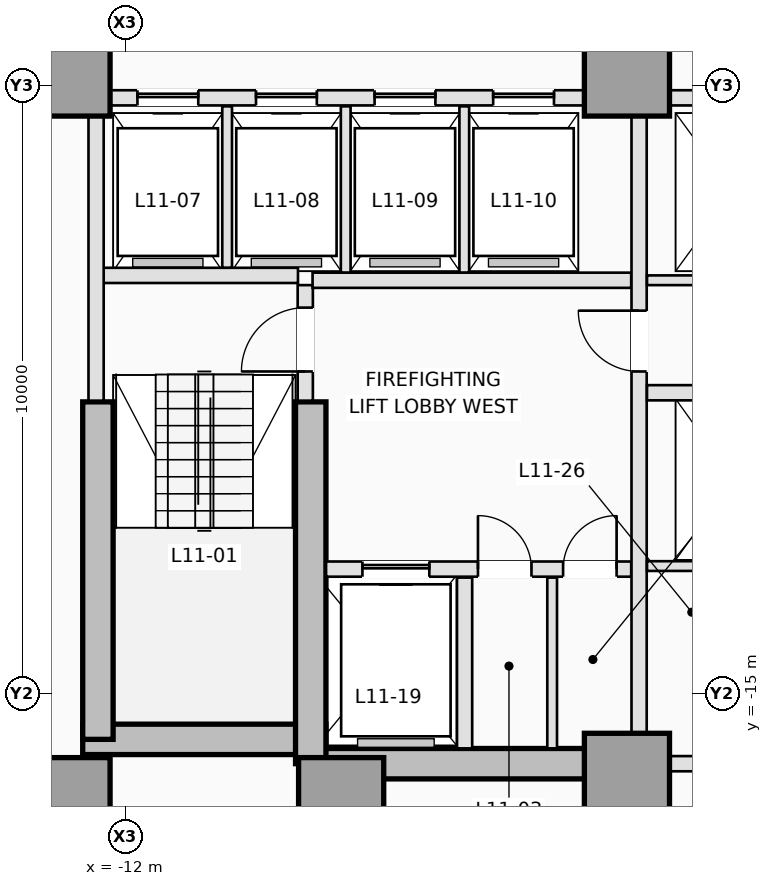
"""IFC4 building model, lengths in metres.
Left out: names, types, materials, properties, quantities, classifications, styles, units other than length and angle.
Written with IfcOpenShell. Run it as: python <this file> out.ifc"""

import sys

from ifc_helpers import new_model, si_unit, direction, frame, frame_2d, origin, origin_2d, place, context, subcontext, project, spatial, rectangle, extrude, element, fill, save


model = new_model("IFC4")
c1 = context("Model", 3, precision=1e-05, world=origin(), true_north=direction((0.0, 1.0)))
c2 = subcontext(c1, "Body", "Model", "MODEL_VIEW")
j1 = project(units=[si_unit("LENGTHUNIT", "METRE"), si_unit("PLANEANGLEUNIT", "RADIAN")], contexts=[c1])
p1 = place(None, origin())
s1 = spatial("IfcSite", under=j1, at=p1, CompositionType="ELEMENT")
p2 = place(p1, origin())
s2 = spatial("IfcBuilding", under=s1, at=p2, CompositionType="ELEMENT")
p3 = place(p2, frame((0.0, 0.0, 45.1)))
s3 = spatial("IfcBuildingStorey", under=s2, at=p3, CompositionType="ELEMENT", Elevation=45.1)
p4 = place(p3, frame((-12.7, -15.75, 0.0), z_axis=(0.0, 0.0, 1.0), x_axis=(1.0, 0.0, 0.0)))
e1 = element("IfcWall", 1, at=p4, inside=s3, PredefinedType="SHEAR", context=c2, shape_type="SweptSolid", body=[
    extrude(rectangle(XDim=4.0, YDim=0.5, at=frame_2d((2.0, 0.0))), origin(), (0.0, 0.0, 1.0), 3.5),
])
p5 = place(p3, frame((-8.95, -16.15, 0.0), z_axis=(0.0, 0.0, 1.0), x_axis=(1.0, 0.0, 0.0)))
e2 = element("IfcWall", 2, at=p5, inside=s3, PredefinedType="SHEAR", context=c2, shape_type="SweptSolid", body=[
    extrude(rectangle(XDim=5.2, YDim=0.5, at=frame_2d((2.6, 0.0))), origin(), (0.0, 0.0, 1.0), 3.5),
])
p6 = place(p3, frame((-12.45, -15.75, 0.0), z_axis=(0.0, 0.0, 1.0), x_axis=(0.0, 1.0, 0.0)))
e3 = element("IfcWall", 3, at=p6, inside=s3, PredefinedType="SHEAR", context=c2, shape_type="SweptSolid", body=[
    extrude(rectangle(XDim=5.55, YDim=0.5, at=frame_2d((2.775, 0.0))), origin(), (0.0, 0.0, 1.0), 3.5),
])
p7 = place(p3, frame((-8.95, -16.15, 0.0), z_axis=(0.0, 0.0, 1.0), x_axis=(0.0, 1.0, 0.0)))
e4 = element("IfcWall", 4, at=p7, inside=s3, PredefinedType="SHEAR", context=c2, shape_type="SweptSolid", body=[
    extrude(rectangle(XDim=5.95, YDim=0.5, at=frame_2d((2.975, 0.0))), origin(), (0.0, 0.0, 1.0), 3.5),
])
for number, where, z_axis, x_axis in (
    (5, (-12.95, -16.75, 0.0), (0.0, 0.0, 1.0), (1.0, 0.0, 0.0)),
    (6, (-8.45, -16.75, 0.0), (0.0, 0.0, 1.0), (1.0, 0.0, 0.0)),
    (7, (-3.75, -16.35, 0.0), (0.0, 0.0, 1.0), (1.0, 0.0, 0.0)),
    (8, (-12.95, -4.8, 0.0), (0.0, 0.0, 1.0), (1.0, 0.0, 0.0)),
    (9, (-3.75, -4.8, 0.0), (0.0, 0.0, 1.0), (1.0, 0.0, 0.0)),
):
    element("IfcColumn", number, at=place(p3, frame(where, z_axis=z_axis, x_axis=x_axis)), inside=s3, PredefinedType="COLUMN", context=c2, shape_type="SweptSolid", body=[
        extrude(rectangle(XDim=1.4, YDim=1.4, at=origin_2d()), origin(), (0.0, 0.0, 1.0), 3.5),
    ])
p8 = place(p3, frame((-9.04, -10.18, 0.0), z_axis=(0.0, 0.0, 1.0), x_axis=(0.0, 1.0, 0.0)))
e10 = element("IfcWall", 10, at=p8, inside=s3, PredefinedType="PARTITIONING", context=c2, shape_type="SweptSolid", body=[
    extrude(rectangle(XDim=1.9, YDim=0.25, at=frame_2d((0.95, 0.0))), origin(), (0.0, 0.0, 1.0), 3.25),
])
p9 = place(p8, frame((0.48, 0.0, 0.0)))
e11 = element("IfcOpeningElement", 11, at=p9, cuts=e10, PredefinedType="OPENING", context=c2, shape_type="SweptSolid", body=[
    extrude(rectangle(XDim=1.05, YDim=2.15, at=frame_2d((0.525, 1.075))), frame((0.0, 0.135, 0.0), z_axis=(0.0, -1.0, 0.0), x_axis=(1.0, 0.0, 0.0)), (0.0, 0.0, 1.0), 0.27),
])
p10 = place(p3, frame((-12.38, -8.12, 0.0), z_axis=(0.0, 0.0, 1.0), x_axis=(1.0, 0.0, 0.0)))
e12 = element("IfcWall", 12, at=p10, inside=s3, PredefinedType="PARTITIONING", context=c2, shape_type="SweptSolid", body=[
    extrude(rectangle(XDim=3.22, YDim=0.25, at=frame_2d((1.61, 0.0))), origin(), (0.0, 0.0, 1.0), 3.25),
])
p11 = place(p3, frame((-12.48, -10.18, 0.0), z_axis=(0.0, 0.0, 1.0), x_axis=(0.0, 1.0, 0.0)))
e13 = element("IfcWall", 13, at=p11, inside=s3, PredefinedType="PARTITIONING", context=c2, shape_type="SweptSolid", body=[
    extrude(rectangle(XDim=4.678, YDim=0.25, at=frame_2d((2.339, 0.0))), origin(), (0.0, 0.0, 1.0), 3.25),
])
p12 = place(p3, frame((-8.698, -12.95, 0.0), z_axis=(0.0, 0.0, 1.0), x_axis=(1.0, 0.0, 0.0)))
e14 = element("IfcWall", 14, at=p12, inside=s3, PredefinedType="PARTITIONING", context=c2, shape_type="SweptSolid", body=[
    extrude(rectangle(XDim=5.018, YDim=0.25, at=frame_2d((2.509, 0.0))), origin(), (0.0, 0.0, 1.0), 3.25),
])
p13 = place(p12, frame((0.598, 0.0, 0.0)))
e15 = element("IfcOpeningElement", 15, at=p13, cuts=e14, PredefinedType="OPENING", context=c2, shape_type="SweptSolid", body=[
    extrude(rectangle(XDim=1.1, YDim=2.15, at=frame_2d((0.55, 1.075))), frame((0.0, 0.135, 0.0), z_axis=(0.0, -1.0, 0.0), x_axis=(1.0, 0.0, 0.0)), (0.0, 0.0, 1.0), 0.27),
])
p14 = place(p12, frame((2.498, 0.0, 0.0)))
e16 = element("IfcOpeningElement", 16, at=p14, cuts=e14, PredefinedType="OPENING", context=c2, shape_type="SweptSolid", body=[
    extrude(rectangle(XDim=0.88, YDim=2.1, at=frame_2d((0.44, 1.05))), frame((0.0, 0.135, 0.0), z_axis=(0.0, -1.0, 0.0), x_axis=(1.0, 0.0, 0.0)), (0.0, 0.0, 1.0), 0.27),
])
p15 = place(p12, frame((3.898, 0.0, 0.0)))
e17 = element("IfcOpeningElement", 17, at=p15, cuts=e14, PredefinedType="OPENING", context=c2, shape_type="SweptSolid", body=[
    extrude(rectangle(XDim=0.88, YDim=2.1, at=frame_2d((0.44, 1.05))), frame((0.0, 0.135, 0.0), z_axis=(0.0, -1.0, 0.0), x_axis=(1.0, 0.0, 0.0)), (0.0, 0.0, 1.0), 0.27),
])
p16 = place(p3, frame((-6.42, -15.898, 0.0), z_axis=(0.0, 0.0, 1.0), x_axis=(0.0, 1.0, 0.0)))
e18 = element("IfcWall", 18, at=p16, inside=s3, PredefinedType="PARTITIONING", context=c2, shape_type="SweptSolid", body=[
    extrude(rectangle(XDim=2.808, YDim=0.25, at=frame_2d((1.404, 0.0))), origin(), (0.0, 0.0, 1.0), 3.25),
])
p17 = place(p3, frame((-4.98, -15.898, 0.0), z_axis=(0.0, 0.0, 1.0), x_axis=(0.0, 1.0, 0.0)))
e19 = element("IfcWall", 19, at=p17, inside=s3, PredefinedType="PARTITIONING", context=c2, shape_type="SweptSolid", body=[
    extrude(rectangle(XDim=2.808, YDim=0.16, at=frame_2d((1.404, 0.0))), origin(), (0.0, 0.0, 1.0), 3.25),
])
p18 = place(p3, frame((-8.92, -8.2, 0.0), z_axis=(0.0, 0.0, 1.0), x_axis=(1.0, 0.0, 0.0)))
e20 = element("IfcWall", 20, at=p18, inside=s3, PredefinedType="PARTITIONING", context=c2, shape_type="SweptSolid", body=[
    extrude(rectangle(XDim=5.24, YDim=0.25, at=frame_2d((2.62, 0.0))), origin(), (0.0, 0.0, 1.0), 3.25),
])
p19 = place(p3, frame((-3.55, -15.648, 0.0), z_axis=(0.0, 0.0, 1.0), x_axis=(0.0, 1.0, 0.0)))
e21 = element("IfcWall", 21, at=p19, inside=s3, PredefinedType="PARTITIONING", context=c2, shape_type="SweptSolid", body=[
    extrude(rectangle(XDim=10.146, YDim=0.25, at=frame_2d((5.073, 0.0))), origin(), (0.0, 0.0, 1.0), 3.25),
])
p20 = place(p19, frame((5.948, 0.0, 0.0)))
e22 = element("IfcOpeningElement", 22, at=p20, cuts=e21, PredefinedType="OPENING", context=c2, shape_type="SweptSolid", body=[
    extrude(rectangle(XDim=1.0, YDim=2.15, at=frame_2d((0.5, 1.075))), frame((0.0, 0.135, 0.0), z_axis=(0.0, -1.0, 0.0), x_axis=(1.0, 0.0, 0.0)), (0.0, 0.0, 1.0), 0.27),
])
p21 = place(p3, frame((-12.248, -5.2, 0.0), z_axis=(0.0, 0.0, 1.0), x_axis=(1.0, 0.0, 0.0)))
e23 = element("IfcWall", 23, at=p21, inside=s3, PredefinedType="PARTITIONING", context=c2, shape_type="SweptSolid", body=[
    extrude(rectangle(XDim=7.796, YDim=0.25, at=frame_2d((3.898, 0.0))), origin(), (0.0, 0.0, 1.0), 3.25),
])
p22 = place(p21, frame((0.448, 0.0, 0.0)))
e24 = element("IfcOpeningElement", 24, at=p22, cuts=e23, PredefinedType="OPENING", context=c2, shape_type="SweptSolid", body=[
    extrude(rectangle(XDim=1.0, YDim=2.15, at=frame_2d((0.5, 1.075))), frame((0.0, 0.135, 0.0), z_axis=(0.0, -1.0, 0.0), x_axis=(1.0, 0.0, 0.0)), (0.0, 0.0, 1.0), 0.27),
])
p23 = place(p21, frame((2.398, 0.0, 0.0)))
e25 = element("IfcOpeningElement", 25, at=p23, cuts=e23, PredefinedType="OPENING", context=c2, shape_type="SweptSolid", body=[
    extrude(rectangle(XDim=1.0, YDim=2.15, at=frame_2d((0.5, 1.075))), frame((0.0, 0.135, 0.0), z_axis=(0.0, -1.0, 0.0), x_axis=(1.0, 0.0, 0.0)), (0.0, 0.0, 1.0), 0.27),
])
p24 = place(p21, frame((4.348, 0.0, 0.0)))
e26 = element("IfcOpeningElement", 26, at=p24, cuts=e23, PredefinedType="OPENING", context=c2, shape_type="SweptSolid", body=[
    extrude(rectangle(XDim=1.0, YDim=2.15, at=frame_2d((0.5, 1.075))), frame((0.0, 0.135, 0.0), z_axis=(0.0, -1.0, 0.0), x_axis=(1.0, 0.0, 0.0)), (0.0, 0.0, 1.0), 0.27),
])
p25 = place(p21, frame((6.298, 0.0, 0.0)))
e27 = element("IfcOpeningElement", 27, at=p25, cuts=e23, PredefinedType="OPENING", context=c2, shape_type="SweptSolid", body=[
    extrude(rectangle(XDim=1.0, YDim=2.15, at=frame_2d((0.5, 1.075))), frame((0.0, 0.135, 0.0), z_axis=(0.0, -1.0, 0.0), x_axis=(1.0, 0.0, 0.0)), (0.0, 0.0, 1.0), 0.27),
])
p26 = place(p3, frame((-3.048, -5.2, 0.0), z_axis=(0.0, 0.0, 1.0), x_axis=(1.0, 0.0, 0.0)))
e28 = element("IfcWall", 28, at=p26, inside=s3, PredefinedType="PARTITIONING", context=c2, shape_type="SweptSolid", body=[
    extrude(rectangle(XDim=2.098, YDim=0.25, at=frame_2d((1.049, 0.0))), origin(), (0.0, 0.0, 1.0), 3.25),
])
p27 = place(p3, frame((-10.325, -7.993, 0.0), z_axis=(0.0, 0.0, 1.0), x_axis=(0.0, 1.0, 0.0)))
e29 = element("IfcWall", 29, at=p27, inside=s3, PredefinedType="PARTITIONING", context=c2, shape_type="SweptSolid", body=[
    extrude(rectangle(XDim=2.653, YDim=0.16, at=frame_2d((1.326, 0.0))), origin(), (0.0, 0.0, 1.0), 3.25),
])
for number, where, z_axis, x_axis in (
    (30, (-8.375, -8.073, 0.0), (0.0, 0.0, 1.0), (0.0, 1.0, 0.0)),
    (31, (-6.425, -8.073, 0.0), (0.0, 0.0, 1.0), (0.0, 1.0, 0.0)),
):
    element("IfcWall", number, at=place(p3, frame(where, z_axis=z_axis, x_axis=x_axis)), inside=s3, PredefinedType="PARTITIONING", context=c2, shape_type="SweptSolid", body=[
        extrude(rectangle(XDim=2.733, YDim=0.16, at=frame_2d((1.366, 0.0))), origin(), (0.0, 0.0, 1.0), 3.25),
    ])
p28 = place(p3, frame((-3.048, -16.15, 0.0), z_axis=(0.0, 0.0, 1.0), x_axis=(1.0, 0.0, 0.0)))
e32 = element("IfcWall", 32, at=p28, inside=s3, PredefinedType="PARTITIONING", context=c2, shape_type="SweptSolid", body=[
    extrude(rectangle(XDim=6.096, YDim=0.25, at=frame_2d((3.048, 0.0))), origin(), (0.0, 0.0, 1.0), 2.3),
])
p29 = place(p3, frame((-3.42, -8.2, 0.0), z_axis=(0.0, 0.0, 1.0), x_axis=(1.0, 0.0, 0.0)))
e33 = element("IfcWall", 33, at=p29, inside=s3, PredefinedType="PARTITIONING", context=c2, shape_type="SweptSolid", body=[
    extrude(rectangle(XDim=2.47, YDim=0.16, at=frame_2d((1.235, 0.0))), origin(), (0.0, 0.0, 1.0), 3.25),
])
p30 = place(p3, frame((-3.42, -10.05, 0.0), z_axis=(0.0, 0.0, 1.0), x_axis=(1.0, 0.0, 0.0)))
e34 = element("IfcWall", 34, at=p30, inside=s3, PredefinedType="PARTITIONING", context=c2, shape_type="SweptSolid", body=[
    extrude(rectangle(XDim=2.47, YDim=0.25, at=frame_2d((1.235, 0.0))), origin(), (0.0, 0.0, 1.0), 3.25),
])
p31 = place(p3, frame((-3.42, -12.9, 0.0), z_axis=(0.0, 0.0, 1.0), x_axis=(1.0, 0.0, 0.0)))
e35 = element("IfcWall", 35, at=p31, inside=s3, PredefinedType="PARTITIONING", context=c2, shape_type="SweptSolid", body=[
    extrude(rectangle(XDim=6.84, YDim=0.16, at=frame_2d((3.42, 0.0))), origin(), (0.0, 0.0, 1.0), 3.25),
])
p32 = place(p31, frame((2.98, 0.0, 0.0)))
e36 = element("IfcOpeningElement", 36, at=p32, cuts=e35, PredefinedType="OPENING", context=c2, shape_type="SweptSolid", body=[
    extrude(rectangle(XDim=0.88, YDim=2.12, at=frame_2d((0.44, 1.06))), frame((0.0, 0.09, 0.0), z_axis=(0.0, -1.0, 0.0), x_axis=(1.0, 0.0, 0.0)), (0.0, 0.0, 1.0), 0.18),
])
p33 = place(p22, origin())
e37 = element("IfcDoor", 37, at=p33, inside=s3, OperationType="SLIDING_TO_LEFT", PredefinedType="DOOR", context=c2, shape_type="SweptSolid", body=[
    extrude(rectangle(XDim=1.0, YDim=2.15, at=frame_2d((0.5, 1.075))), frame((0.0, 0.025, 0.0), z_axis=(0.0, -1.0, 0.0), x_axis=(1.0, 0.0, 0.0)), (0.0, 0.0, 1.0), 0.05),
])
fill(e24, e37)
p34 = place(p23, origin())
e38 = element("IfcDoor", 38, at=p34, inside=s3, OperationType="SLIDING_TO_LEFT", PredefinedType="DOOR", context=c2, shape_type="SweptSolid", body=[
    extrude(rectangle(XDim=1.0, YDim=2.15, at=frame_2d((0.5, 1.075))), frame((0.0, 0.025, 0.0), z_axis=(0.0, -1.0, 0.0), x_axis=(1.0, 0.0, 0.0)), (0.0, 0.0, 1.0), 0.05),
])
fill(e25, e38)
p35 = place(p24, origin())
e39 = element("IfcDoor", 39, at=p35, inside=s3, OperationType="SLIDING_TO_LEFT", PredefinedType="DOOR", context=c2, shape_type="SweptSolid", body=[
    extrude(rectangle(XDim=1.0, YDim=2.15, at=frame_2d((0.5, 1.075))), frame((0.0, 0.025, 0.0), z_axis=(0.0, -1.0, 0.0), x_axis=(1.0, 0.0, 0.0)), (0.0, 0.0, 1.0), 0.05),
])
fill(e26, e39)
p36 = place(p25, origin())
e40 = element("IfcDoor", 40, at=p36, inside=s3, OperationType="SLIDING_TO_LEFT", PredefinedType="DOOR", context=c2, shape_type="SweptSolid", body=[
    extrude(rectangle(XDim=1.0, YDim=2.15, at=frame_2d((0.5, 1.075))), frame((0.0, 0.025, 0.0), z_axis=(0.0, -1.0, 0.0), x_axis=(1.0, 0.0, 0.0)), (0.0, 0.0, 1.0), 0.05),
])
fill(e27, e40)
p37 = place(p13, origin())
e41 = element("IfcDoor", 41, at=p37, inside=s3, OperationType="SLIDING_TO_LEFT", PredefinedType="DOOR", context=c2, shape_type="SweptSolid", body=[
    extrude(rectangle(XDim=1.1, YDim=2.15, at=frame_2d((0.55, 1.075))), frame((0.0, 0.025, 0.0), z_axis=(0.0, -1.0, 0.0), x_axis=(1.0, 0.0, 0.0)), (0.0, 0.0, 1.0), 0.05),
])
fill(e15, e41)
p38 = place(p9, origin())
e42 = element("IfcDoor", 42, at=p38, inside=s3, OperationType="SINGLE_SWING_LEFT", PredefinedType="DOOR", context=c2, shape_type="SweptSolid", body=[
    extrude(rectangle(XDim=1.05, YDim=2.15, at=frame_2d((0.525, 1.075))), frame((0.0, 0.025, 0.0), z_axis=(0.0, -1.0, 0.0), x_axis=(1.0, 0.0, 0.0)), (0.0, 0.0, 1.0), 0.05),
])
fill(e11, e42)
p39 = place(p14, origin())
e43 = element("IfcDoor", 43, at=p39, inside=s3, OperationType="SINGLE_SWING_LEFT", PredefinedType="TRAPDOOR", context=c2, shape_type="SweptSolid", body=[
    extrude(rectangle(XDim=0.88, YDim=2.1, at=frame_2d((0.44, 1.05))), frame((0.0, 0.025, 0.0), z_axis=(0.0, -1.0, 0.0), x_axis=(1.0, 0.0, 0.0)), (0.0, 0.0, 1.0), 0.05),
])
fill(e16, e43)
p40 = place(p15, origin())
e44 = element("IfcDoor", 44, at=p40, inside=s3, OperationType="SINGLE_SWING_RIGHT", PredefinedType="TRAPDOOR", context=c2, shape_type="SweptSolid", body=[
    extrude(rectangle(XDim=0.88, YDim=2.1, at=frame_2d((0.44, 1.05))), frame((0.0, 0.025, 0.0), z_axis=(0.0, -1.0, 0.0), x_axis=(1.0, 0.0, 0.0)), (0.0, 0.0, 1.0), 0.05),
])
fill(e17, e44)
p41 = place(p20, origin())
e45 = element("IfcDoor", 45, at=p41, inside=s3, OperationType="SINGLE_SWING_RIGHT", PredefinedType="DOOR", context=c2, shape_type="SweptSolid", body=[
    extrude(rectangle(XDim=1.0, YDim=2.15, at=frame_2d((0.5, 1.075))), frame((0.0, 0.025, 0.0), z_axis=(0.0, -1.0, 0.0), x_axis=(1.0, 0.0, 0.0)), (0.0, 0.0, 1.0), 0.05),
])
fill(e22, e45)
save(model, sys.argv[1])
